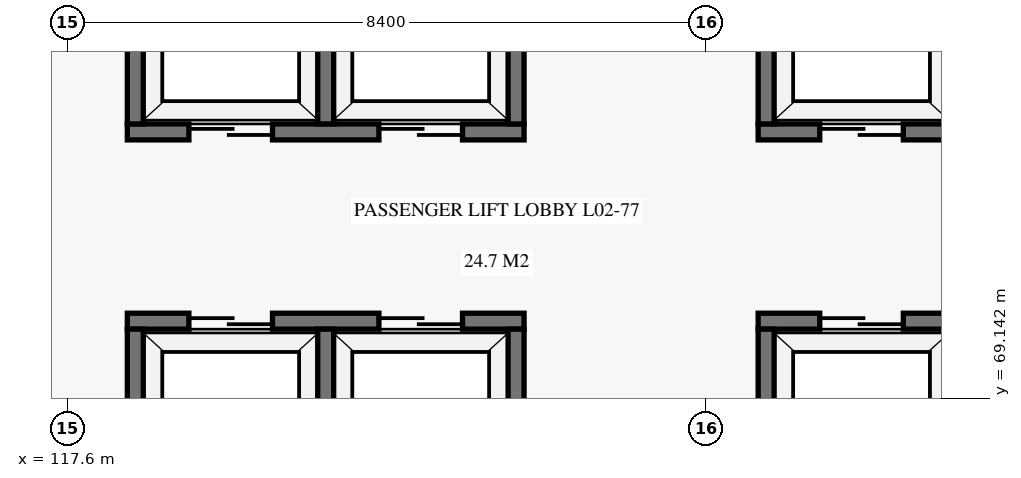
"""IFC4 building model, lengths in metres.
Left out: names, types, materials, properties, quantities, classifications, styles, units other than length and angle.
Written with IfcOpenShell. Run it as: python <this file> out.ifc"""

import sys

from ifc_helpers import new_model, si_unit, direction, frame, frame_2d, origin, place, context, subcontext, project, spatial, rectangle, extrude, element, fill, save


model = new_model("IFC4")
c1 = context("Model", 3, precision=1e-05, world=origin(), true_north=direction((0.0, 1.0)))
c2 = subcontext(c1, "Body", "Model", "MODEL_VIEW")
j1 = project(units=[si_unit("LENGTHUNIT", "METRE"), si_unit("PLANEANGLEUNIT", "RADIAN")], contexts=[c1])
p1 = place(None, origin())
s1 = spatial("IfcSite", under=j1, at=p1, CompositionType="ELEMENT")
p2 = place(p1, origin())
s2 = spatial("IfcBuilding", under=s1, at=p2, CompositionType="ELEMENT")
p3 = place(p2, frame((0.0, 0.0, 6.0)))
s3 = spatial("IfcBuildingStorey", under=s2, at=p3, CompositionType="ELEMENT", Elevation=6.0)
p4 = place(p3, frame((126.69, 70.155, 0.0), z_axis=(0.0, 0.0, 1.0), x_axis=(1.0, 0.0, 0.0)))
e1 = element("IfcWall", 1, at=p4, inside=s3, PredefinedType="SHEAR", context=c2, shape_type="SweptSolid", body=[
    extrude(rectangle(XDim=5.22, YDim=0.21, at=frame_2d((2.61, 0.0))), origin(), (0.0, 0.0, 1.0), 5.1),
])
p5 = place(p4, frame((0.81, 0.0, 0.0)))
e2 = element("IfcOpeningElement", 2, at=p5, cuts=e1, PredefinedType="OPENING", context=c2, shape_type="SweptSolid", body=[
    extrude(rectangle(XDim=1.1, YDim=2.15, at=frame_2d((0.55, 1.075))), frame((0.0, 0.115, 0.0), z_axis=(0.0, -1.0, 0.0), x_axis=(1.0, 0.0, 0.0)), (0.0, 0.0, 1.0), 0.23),
])
p6 = place(p4, frame((3.31, 0.0, 0.0)))
e3 = element("IfcOpeningElement", 3, at=p6, cuts=e1, PredefinedType="OPENING", context=c2, shape_type="SweptSolid", body=[
    extrude(rectangle(XDim=1.1, YDim=2.15, at=frame_2d((0.55, 1.075))), frame((0.0, 0.115, 0.0), z_axis=(0.0, -1.0, 0.0), x_axis=(1.0, 0.0, 0.0)), (0.0, 0.0, 1.0), 0.23),
])
p7 = place(p3, frame((126.795, 67.85, 0.0), z_axis=(0.0, 0.0, 1.0), x_axis=(0.0, 1.0, 0.0)))
e4 = element("IfcWall", 4, at=p7, inside=s3, PredefinedType="SHEAR", context=c2, shape_type="SweptSolid", body=[
    extrude(rectangle(XDim=2.2, YDim=0.21, at=frame_2d((1.1, 0.0))), origin(), (0.0, 0.0, 1.0), 5.1),
])
p8 = place(p3, frame((126.69, 72.645, 0.0), z_axis=(0.0, 0.0, 1.0), x_axis=(1.0, 0.0, 0.0)))
e5 = element("IfcWall", 5, at=p8, inside=s3, PredefinedType="SHEAR", context=c2, shape_type="SweptSolid", body=[
    extrude(rectangle(XDim=5.22, YDim=0.21, at=frame_2d((2.61, 0.0))), origin(), (0.0, 0.0, 1.0), 5.1),
])
p9 = place(p8, frame((0.81, 0.0, 0.0)))
e6 = element("IfcOpeningElement", 6, at=p9, cuts=e5, PredefinedType="OPENING", context=c2, shape_type="SweptSolid", body=[
    extrude(rectangle(XDim=1.1, YDim=2.15, at=frame_2d((0.55, 1.075))), frame((0.0, 0.115, 0.0), z_axis=(0.0, -1.0, 0.0), x_axis=(1.0, 0.0, 0.0)), (0.0, 0.0, 1.0), 0.23),
])
p10 = place(p8, frame((3.31, 0.0, 0.0)))
e7 = element("IfcOpeningElement", 7, at=p10, cuts=e5, PredefinedType="OPENING", context=c2, shape_type="SweptSolid", body=[
    extrude(rectangle(XDim=1.1, YDim=2.15, at=frame_2d((0.55, 1.075))), frame((0.0, 0.115, 0.0), z_axis=(0.0, -1.0, 0.0), x_axis=(1.0, 0.0, 0.0)), (0.0, 0.0, 1.0), 0.23),
])
p11 = place(p3, frame((126.795, 72.75, 0.0), z_axis=(0.0, 0.0, 1.0), x_axis=(0.0, 1.0, 0.0)))
e8 = element("IfcWall", 8, at=p11, inside=s3, PredefinedType="SHEAR", context=c2, shape_type="SweptSolid", body=[
    extrude(rectangle(XDim=2.2, YDim=0.21, at=frame_2d((1.1, 0.0))), origin(), (0.0, 0.0, 1.0), 5.1),
])
p12 = place(p3, frame((118.39, 70.155, 0.0), z_axis=(0.0, 0.0, 1.0), x_axis=(1.0, 0.0, 0.0)))
e9 = element("IfcWall", 9, at=p12, inside=s3, PredefinedType="SHEAR", context=c2, shape_type="SweptSolid", body=[
    extrude(rectangle(XDim=5.22, YDim=0.21, at=frame_2d((2.61, 0.0))), origin(), (0.0, 0.0, 1.0), 5.1),
])
p13 = place(p12, frame((0.81, 0.0, 0.0)))
e10 = element("IfcOpeningElement", 10, at=p13, cuts=e9, PredefinedType="OPENING", context=c2, shape_type="SweptSolid", body=[
    extrude(rectangle(XDim=1.1, YDim=2.15, at=frame_2d((0.55, 1.075))), frame((0.0, 0.115, 0.0), z_axis=(0.0, -1.0, 0.0), x_axis=(1.0, 0.0, 0.0)), (0.0, 0.0, 1.0), 0.23),
])
p14 = place(p12, frame((3.31, 0.0, 0.0)))
e11 = element("IfcOpeningElement", 11, at=p14, cuts=e9, PredefinedType="OPENING", context=c2, shape_type="SweptSolid", body=[
    extrude(rectangle(XDim=1.1, YDim=2.15, at=frame_2d((0.55, 1.075))), frame((0.0, 0.115, 0.0), z_axis=(0.0, -1.0, 0.0), x_axis=(1.0, 0.0, 0.0)), (0.0, 0.0, 1.0), 0.23),
])
for number, where, z_axis, x_axis in (
    (12, (118.495, 67.85, 0.0), (0.0, 0.0, 1.0), (0.0, 1.0, 0.0)),
    (13, (123.505, 67.85, 0.0), (0.0, 0.0, 1.0), (0.0, 1.0, 0.0)),
    (14, (121.0, 67.85, 0.0), (0.0, 0.0, 1.0), (0.0, 1.0, 0.0)),
):
    element("IfcWall", number, at=place(p3, frame(where, z_axis=z_axis, x_axis=x_axis)), inside=s3, PredefinedType="SHEAR", context=c2, shape_type="SweptSolid", body=[
        extrude(rectangle(XDim=2.2, YDim=0.21, at=frame_2d((1.1, 0.0))), origin(), (0.0, 0.0, 1.0), 5.1),
    ])
p15 = place(p3, frame((118.39, 72.645, 0.0), z_axis=(0.0, 0.0, 1.0), x_axis=(1.0, 0.0, 0.0)))
e15 = element("IfcWall", 15, at=p15, inside=s3, PredefinedType="SHEAR", context=c2, shape_type="SweptSolid", body=[
    extrude(rectangle(XDim=5.22, YDim=0.21, at=frame_2d((2.61, 0.0))), origin(), (0.0, 0.0, 1.0), 5.1),
])
p16 = place(p15, frame((0.81, 0.0, 0.0)))
e16 = element("IfcOpeningElement", 16, at=p16, cuts=e15, PredefinedType="OPENING", context=c2, shape_type="SweptSolid", body=[
    extrude(rectangle(XDim=1.1, YDim=2.15, at=frame_2d((0.55, 1.075))), frame((0.0, 0.115, 0.0), z_axis=(0.0, -1.0, 0.0), x_axis=(1.0, 0.0, 0.0)), (0.0, 0.0, 1.0), 0.23),
])
p17 = place(p15, frame((3.31, 0.0, 0.0)))
e17 = element("IfcOpeningElement", 17, at=p17, cuts=e15, PredefinedType="OPENING", context=c2, shape_type="SweptSolid", body=[
    extrude(rectangle(XDim=1.1, YDim=2.15, at=frame_2d((0.55, 1.075))), frame((0.0, 0.115, 0.0), z_axis=(0.0, -1.0, 0.0), x_axis=(1.0, 0.0, 0.0)), (0.0, 0.0, 1.0), 0.23),
])
for number, where, z_axis, x_axis in (
    (18, (118.495, 72.75, 0.0), (0.0, 0.0, 1.0), (0.0, 1.0, 0.0)),
    (19, (123.505, 72.75, 0.0), (0.0, 0.0, 1.0), (0.0, 1.0, 0.0)),
    (20, (121.0, 72.75, 0.0), (0.0, 0.0, 1.0), (0.0, 1.0, 0.0)),
):
    element("IfcWall", number, at=place(p3, frame(where, z_axis=z_axis, x_axis=x_axis)), inside=s3, PredefinedType="SHEAR", context=c2, shape_type="SweptSolid", body=[
        extrude(rectangle(XDim=2.2, YDim=0.21, at=frame_2d((1.1, 0.0))), origin(), (0.0, 0.0, 1.0), 5.1),
    ])
p18 = place(p5, origin())
e21 = element("IfcDoor", 21, at=p18, inside=s3, OperationType="DOUBLE_DOOR_SLIDING", PredefinedType="DOOR", context=c2, shape_type="SweptSolid", body=[
    extrude(rectangle(XDim=1.1, YDim=2.15, at=frame_2d((0.55, 1.075))), frame((0.0, 0.025, 0.0), z_axis=(0.0, -1.0, 0.0), x_axis=(1.0, 0.0, 0.0)), (0.0, 0.0, 1.0), 0.05),
])
fill(e2, e21)
p19 = place(p9, origin())
e22 = element("IfcDoor", 22, at=p19, inside=s3, OperationType="DOUBLE_DOOR_SLIDING", PredefinedType="DOOR", context=c2, shape_type="SweptSolid", body=[
    extrude(rectangle(XDim=1.1, YDim=2.15, at=frame_2d((0.55, 1.075))), frame((0.0, 0.025, 0.0), z_axis=(0.0, -1.0, 0.0), x_axis=(1.0, 0.0, 0.0)), (0.0, 0.0, 1.0), 0.05),
])
fill(e6, e22)
p20 = place(p13, origin())
e23 = element("IfcDoor", 23, at=p20, inside=s3, OperationType="DOUBLE_DOOR_SLIDING", PredefinedType="DOOR", context=c2, shape_type="SweptSolid", body=[
    extrude(rectangle(XDim=1.1, YDim=2.15, at=frame_2d((0.55, 1.075))), frame((0.0, 0.025, 0.0), z_axis=(0.0, -1.0, 0.0), x_axis=(1.0, 0.0, 0.0)), (0.0, 0.0, 1.0), 0.05),
])
fill(e10, e23)
p21 = place(p14, origin())
e24 = element("IfcDoor", 24, at=p21, inside=s3, OperationType="DOUBLE_DOOR_SLIDING", PredefinedType="DOOR", context=c2, shape_type="SweptSolid", body=[
    extrude(rectangle(XDim=1.1, YDim=2.15, at=frame_2d((0.55, 1.075))), frame((0.0, 0.025, 0.0), z_axis=(0.0, -1.0, 0.0), x_axis=(1.0, 0.0, 0.0)), (0.0, 0.0, 1.0), 0.05),
])
fill(e11, e24)
p22 = place(p16, origin())
e25 = element("IfcDoor", 25, at=p22, inside=s3, OperationType="DOUBLE_DOOR_SLIDING", PredefinedType="DOOR", context=c2, shape_type="SweptSolid", body=[
    extrude(rectangle(XDim=1.1, YDim=2.15, at=frame_2d((0.55, 1.075))), frame((0.0, 0.025, 0.0), z_axis=(0.0, -1.0, 0.0), x_axis=(1.0, 0.0, 0.0)), (0.0, 0.0, 1.0), 0.05),
])
fill(e16, e25)
p23 = place(p17, origin())
e26 = element("IfcDoor", 26, at=p23, inside=s3, OperationType="DOUBLE_DOOR_SLIDING", PredefinedType="DOOR", context=c2, shape_type="SweptSolid", body=[
    extrude(rectangle(XDim=1.1, YDim=2.15, at=frame_2d((0.55, 1.075))), frame((0.0, 0.025, 0.0), z_axis=(0.0, -1.0, 0.0), x_axis=(1.0, 0.0, 0.0)), (0.0, 0.0, 1.0), 0.05),
])
fill(e17, e26)
save(model, sys.argv[1])
